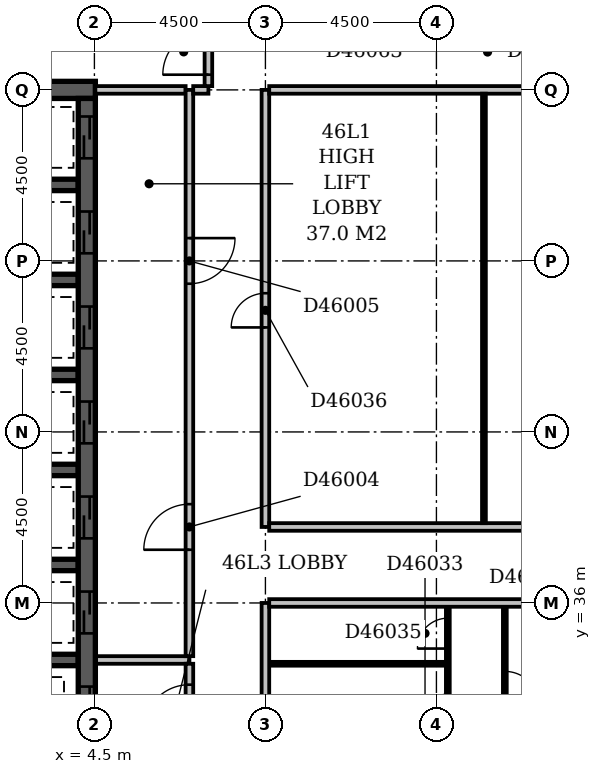
"""IFC4 building model, lengths in metres.
Left out: names, types, materials, properties, quantities, classifications, styles, units other than length and angle.
Written with IfcOpenShell. Run it as: python <this file> out.ifc"""

import sys

from ifc_helpers import new_model, si_unit, direction, frame, frame_2d, origin, place, context, subcontext, project, spatial, rectangle, extrude, element, fill, save


model = new_model("IFC4")
c1 = context("Model", 3, precision=1e-05, world=origin(), true_north=direction((0.0, 1.0)))
c2 = subcontext(c1, "Body", "Model", "MODEL_VIEW")
j1 = project(units=[si_unit("LENGTHUNIT", "METRE"), si_unit("PLANEANGLEUNIT", "RADIAN")], contexts=[c1])
p1 = place(None, origin())
s1 = spatial("IfcSite", under=j1, at=p1, CompositionType="ELEMENT")
p2 = place(p1, origin())
s2 = spatial("IfcBuilding", under=s1, at=p2, CompositionType="ELEMENT")
p3 = place(p2, frame((0.0, 0.0, 182.6)))
s3 = spatial("IfcBuildingStorey", under=s2, at=p3, CompositionType="ELEMENT", Elevation=182.6)
p4 = place(p3, frame((0.275, 49.5, -0.3), z_axis=(0.0, 0.0, 1.0), x_axis=(1.0, 0.0, 0.0)))
e1 = element("IfcWall", 1, at=p4, inside=s3, PredefinedType="SHEAR", context=c2, shape_type="SweptSolid", body=[
    extrude(rectangle(XDim=4.25, YDim=0.45, at=frame_2d((2.125, 0.0))), origin(), (0.0, 0.0, 1.0), 3.55),
])
for number, where, z_axis, x_axis in (
    (2, (0.725, 34.5, -0.3), (0.0, 0.0, 1.0), (1.0, 0.0, 0.0)),
    (3, (0.725, 37.0, -0.3), (0.0, 0.0, 1.0), (1.0, 0.0, 0.0)),
    (4, (0.725, 39.5, -0.3), (0.0, 0.0, 1.0), (1.0, 0.0, 0.0)),
    (5, (0.725, 42.0, -0.3), (0.0, 0.0, 1.0), (1.0, 0.0, 0.0)),
    (6, (0.725, 44.5, -0.3), (0.0, 0.0, 1.0), (1.0, 0.0, 0.0)),
    (7, (0.725, 47.0, -0.3), (0.0, 0.0, 1.0), (1.0, 0.0, 0.0)),
):
    element("IfcWall", number, at=place(p3, frame(where, z_axis=z_axis, x_axis=x_axis)), inside=s3, PredefinedType="SHEAR", context=c2, shape_type="SweptSolid", body=[
        extrude(rectangle(XDim=3.35, YDim=0.3, at=frame_2d((1.675, 0.0))), origin(), (0.0, 0.0, 1.0), 3.55),
    ])
p5 = place(p3, frame((4.3, 27.15, -0.3), z_axis=(0.0, 0.0, 1.0), x_axis=(0.0, 1.0, 0.0)))
e8 = element("IfcWall", 8, at=p5, inside=s3, PredefinedType="SHEAR", context=c2, shape_type="SweptSolid", body=[
    extrude(rectangle(XDim=22.125, YDim=0.45, at=frame_2d((11.062, 0.0))), origin(), (0.0, 0.0, 1.0), 3.55),
])
p6 = place(p5, frame((3.05, 0.0, 0.3)))
e9 = element("IfcOpeningElement", 9, at=p6, cuts=e8, PredefinedType="OPENING", context=c2, shape_type="SweptSolid", body=[
    extrude(rectangle(XDim=1.1, YDim=2.1, at=frame_2d((0.55, 1.05))), frame((0.0, 0.237, 0.0), z_axis=(0.0, -1.0, 0.0), x_axis=(1.0, 0.0, 0.0)), (0.0, 0.0, 1.0), 0.474),
])
p7 = place(p5, frame((0.55, 0.0, 0.3)))
e10 = element("IfcOpeningElement", 10, at=p7, cuts=e8, PredefinedType="OPENING", context=c2, shape_type="SweptSolid", body=[
    extrude(rectangle(XDim=1.1, YDim=2.1, at=frame_2d((0.55, 1.05))), frame((0.0, 0.237, 0.0), z_axis=(0.0, -1.0, 0.0), x_axis=(1.0, 0.0, 0.0)), (0.0, 0.0, 1.0), 0.474),
])
p8 = place(p5, frame((20.55, 0.0, 0.3)))
e11 = element("IfcOpeningElement", 11, at=p8, cuts=e8, PredefinedType="OPENING", context=c2, shape_type="SweptSolid", body=[
    extrude(rectangle(XDim=1.1, YDim=2.1, at=frame_2d((0.55, 1.05))), frame((0.0, 0.237, 0.0), z_axis=(0.0, -1.0, 0.0), x_axis=(1.0, 0.0, 0.0)), (0.0, 0.0, 1.0), 0.474),
])
p9 = place(p5, frame((18.05, 0.0, 0.3)))
e12 = element("IfcOpeningElement", 12, at=p9, cuts=e8, PredefinedType="OPENING", context=c2, shape_type="SweptSolid", body=[
    extrude(rectangle(XDim=1.1, YDim=2.1, at=frame_2d((0.55, 1.05))), frame((0.0, 0.237, 0.0), z_axis=(0.0, -1.0, 0.0), x_axis=(1.0, 0.0, 0.0)), (0.0, 0.0, 1.0), 0.474),
])
p10 = place(p5, frame((15.55, 0.0, 0.3)))
e13 = element("IfcOpeningElement", 13, at=p10, cuts=e8, PredefinedType="OPENING", context=c2, shape_type="SweptSolid", body=[
    extrude(rectangle(XDim=1.1, YDim=2.1, at=frame_2d((0.55, 1.05))), frame((0.0, 0.237, 0.0), z_axis=(0.0, -1.0, 0.0), x_axis=(1.0, 0.0, 0.0)), (0.0, 0.0, 1.0), 0.474),
])
p11 = place(p5, frame((13.05, 0.0, 0.3)))
e14 = element("IfcOpeningElement", 14, at=p11, cuts=e8, PredefinedType="OPENING", context=c2, shape_type="SweptSolid", body=[
    extrude(rectangle(XDim=1.1, YDim=2.1, at=frame_2d((0.55, 1.05))), frame((0.0, 0.237, 0.0), z_axis=(0.0, -1.0, 0.0), x_axis=(1.0, 0.0, 0.0)), (0.0, 0.0, 1.0), 0.474),
])
p12 = place(p5, frame((10.55, 0.0, 0.3)))
e15 = element("IfcOpeningElement", 15, at=p12, cuts=e8, PredefinedType="OPENING", context=c2, shape_type="SweptSolid", body=[
    extrude(rectangle(XDim=1.1, YDim=2.1, at=frame_2d((0.55, 1.05))), frame((0.0, 0.237, 0.0), z_axis=(0.0, -1.0, 0.0), x_axis=(1.0, 0.0, 0.0)), (0.0, 0.0, 1.0), 0.474),
])
p13 = place(p5, frame((8.05, 0.0, 0.3)))
e16 = element("IfcOpeningElement", 16, at=p13, cuts=e8, PredefinedType="OPENING", context=c2, shape_type="SweptSolid", body=[
    extrude(rectangle(XDim=1.1, YDim=2.1, at=frame_2d((0.55, 1.05))), frame((0.0, 0.237, 0.0), z_axis=(0.0, -1.0, 0.0), x_axis=(1.0, 0.0, 0.0)), (0.0, 0.0, 1.0), 0.474),
])
p14 = place(p5, frame((5.55, 0.0, 0.3)))
e17 = element("IfcOpeningElement", 17, at=p14, cuts=e8, PredefinedType="OPENING", context=c2, shape_type="SweptSolid", body=[
    extrude(rectangle(XDim=1.1, YDim=2.1, at=frame_2d((0.55, 1.05))), frame((0.0, 0.237, 0.0), z_axis=(0.0, -1.0, 0.0), x_axis=(1.0, 0.0, 0.0)), (0.0, 0.0, 1.0), 0.474),
])
p15 = place(p3, frame((4.545, 34.5, 0.0), z_axis=(0.0, 0.0, 1.0), x_axis=(1.0, 0.0, 0.0)))
e18 = element("IfcWall", 18, at=p15, inside=s3, PredefinedType="PARTITIONING", context=c2, shape_type="SweptSolid", body=[
    extrude(rectangle(XDim=2.455, YDim=0.2, at=frame_2d((1.228, 0.0))), origin(), (0.0, 0.0, 1.0), 3.25),
])
p16 = place(p3, frame((7.0, 34.6, 0.0), z_axis=(0.0, 0.0, 1.0), x_axis=(0.0, 1.0, 0.0)))
e19 = element("IfcWall", 19, at=p16, inside=s3, PredefinedType="PARTITIONING", context=c2, shape_type="SweptSolid", body=[
    extrude(rectangle(XDim=14.9, YDim=0.2, at=frame_2d((7.45, 0.0))), origin(), (0.0, 0.0, 1.0), 3.25),
])
p17 = place(p16, frame((2.8, 0.0, 0.0)))
e20 = element("IfcOpeningElement", 20, at=p17, cuts=e19, PredefinedType="OPENING", context=c2, shape_type="SweptSolid", body=[
    extrude(rectangle(XDim=1.2, YDim=2.1, at=frame_2d((0.6, 1.05))), frame((0.0, 0.112, 0.0), z_axis=(0.0, -1.0, 0.0), x_axis=(1.0, 0.0, 0.0)), (0.0, 0.0, 1.0), 0.224),
])
p18 = place(p16, frame((9.8, 0.0, 0.0)))
e21 = element("IfcOpeningElement", 21, at=p18, cuts=e19, PredefinedType="OPENING", context=c2, shape_type="SweptSolid", body=[
    extrude(rectangle(XDim=1.2, YDim=2.1, at=frame_2d((0.6, 1.05))), frame((0.0, 0.112, 0.0), z_axis=(0.0, -1.0, 0.0), x_axis=(1.0, 0.0, 0.0)), (0.0, 0.0, 1.0), 0.224),
])
p19 = place(p3, frame((4.525, 49.5, 0.0), z_axis=(0.0, 0.0, 1.0), x_axis=(1.0, 0.0, 0.0)))
e22 = element("IfcWall", 22, at=p19, inside=s3, PredefinedType="PARTITIONING", context=c2, shape_type="SweptSolid", body=[
    extrude(rectangle(XDim=2.375, YDim=0.2, at=frame_2d((1.188, 0.0))), origin(), (0.0, 0.0, 1.0), 3.25),
])
p20 = place(p3, frame((7.0, 32.1, 0.0), z_axis=(0.0, 0.0, 1.0), x_axis=(0.0, 1.0, 0.0)))
e23 = element("IfcWall", 23, at=p20, inside=s3, PredefinedType="PARTITIONING", context=c2, shape_type="SweptSolid", body=[
    extrude(rectangle(XDim=2.3, YDim=0.2, at=frame_2d((1.15, 0.0))), origin(), (0.0, 0.0, 1.0), 3.25),
])
p21 = place(p20, frame((0.55, 0.0, 0.0)))
e24 = element("IfcOpeningElement", 24, at=p21, cuts=e23, PredefinedType="OPENING", context=c2, shape_type="SweptSolid", body=[
    extrude(rectangle(XDim=1.2, YDim=2.1, at=frame_2d((0.6, 1.05))), frame((0.0, 0.112, 0.0), z_axis=(0.0, -1.0, 0.0), x_axis=(1.0, 0.0, 0.0)), (0.0, 0.0, 1.0), 0.224),
])
p22 = place(p3, frame((7.1, 49.5, 0.0), z_axis=(0.0, 0.0, 1.0), x_axis=(1.0, 0.0, 0.0)))
e25 = element("IfcWall", 25, at=p22, inside=s3, PredefinedType="PARTITIONING", context=c2, shape_type="SweptSolid", body=[
    extrude(rectangle(XDim=0.4, YDim=0.2, at=frame_2d((0.2, 0.0))), origin(), (0.0, 0.0, 1.0), 3.25),
])
p23 = place(p3, frame((7.5, 49.6, 0.0), z_axis=(0.0, 0.0, 1.0), x_axis=(0.0, 1.0, 0.0)))
e26 = element("IfcWall", 26, at=p23, inside=s3, PredefinedType="PARTITIONING", context=c2, shape_type="SweptSolid", body=[
    extrude(rectangle(XDim=3.9, YDim=0.2, at=frame_2d((1.95, 0.0))), origin(), (0.0, 0.0, 1.0), 3.25),
])
p24 = place(p23, frame((0.3, 0.0, 0.0)))
e27 = element("IfcOpeningElement", 27, at=p24, cuts=e26, PredefinedType="OPENING", context=c2, shape_type="SweptSolid", body=[
    extrude(rectangle(XDim=1.2, YDim=2.1, at=frame_2d((0.6, 1.05))), frame((0.0, 0.112, 0.0), z_axis=(0.0, -1.0, 0.0), x_axis=(1.0, 0.0, 0.0)), (0.0, 0.0, 1.0), 0.224),
])
p25 = place(p3, frame((9.0, 5.0, 0.0), z_axis=(0.0, 0.0, 1.0), x_axis=(0.0, 1.0, 0.0)))
e28 = element("IfcWall", 28, at=p25, inside=s3, PredefinedType="PARTITIONING", context=c2, shape_type="SweptSolid", body=[
    extrude(rectangle(XDim=31.0, YDim=0.2, at=frame_2d((15.5, 0.0))), origin(), (0.0, 0.0, 1.0), 3.25),
])
p26 = place(p25, frame((17.8, 0.0, 0.0)))
e29 = element("IfcOpeningElement", 29, at=p26, cuts=e28, PredefinedType="OPENING", context=c2, shape_type="SweptSolid", body=[
    extrude(rectangle(XDim=1.0, YDim=2.1, at=frame_2d((0.5, 1.05))), frame((0.0, 0.112, 0.0), z_axis=(0.0, -1.0, 0.0), x_axis=(1.0, 0.0, 0.0)), (0.0, 0.0, 1.0), 0.224),
])
p27 = place(p25, frame((14.95, 0.0, 0.0)))
e30 = element("IfcOpeningElement", 30, at=p27, cuts=e28, PredefinedType="OPENING", context=c2, shape_type="SweptSolid", body=[
    extrude(rectangle(XDim=1.0, YDim=2.1, at=frame_2d((0.5, 1.05))), frame((0.0, 0.112, 0.0), z_axis=(0.0, -1.0, 0.0), x_axis=(1.0, 0.0, 0.0)), (0.0, 0.0, 1.0), 0.224),
])
p28 = place(p25, frame((9.3, 0.0, 0.0)))
e31 = element("IfcOpeningElement", 31, at=p28, cuts=e28, PredefinedType="OPENING", context=c2, shape_type="SweptSolid", body=[
    extrude(rectangle(XDim=1.0, YDim=2.1, at=frame_2d((0.5, 1.05))), frame((0.0, 0.112, 0.0), z_axis=(0.0, -1.0, 0.0), x_axis=(1.0, 0.0, 0.0)), (0.0, 0.0, 1.0), 0.224),
])
p29 = place(p25, frame((1.5, 0.0, 0.0)))
e32 = element("IfcOpeningElement", 32, at=p29, cuts=e28, PredefinedType="OPENING", context=c2, shape_type="SweptSolid", body=[
    extrude(rectangle(XDim=0.9, YDim=2.1, at=frame_2d((0.45, 1.05))), frame((0.0, 0.112, 0.0), z_axis=(0.0, -1.0, 0.0), x_axis=(1.0, 0.0, 0.0)), (0.0, 0.0, 1.0), 0.224),
])
p30 = place(p3, frame((15.3, 22.6, 0.0), z_axis=(0.0, 0.0, 1.0), x_axis=(0.0, 1.0, 0.0)))
e33 = element("IfcWall", 33, at=p30, inside=s3, PredefinedType="PARTITIONING", context=c2, shape_type="SweptSolid", body=[
    extrude(rectangle(XDim=13.3, YDim=0.1, at=frame_2d((6.65, 0.0))), origin(), (0.0, 0.0, 1.0), 3.25),
])
p31 = place(p30, frame((1.7, 0.0, 0.0)))
e34 = element("IfcOpeningElement", 34, at=p31, cuts=e33, PredefinedType="OPENING", context=c2, shape_type="SweptSolid", body=[
    extrude(rectangle(XDim=0.9, YDim=2.1, at=frame_2d((0.45, 1.05))), frame((0.0, 0.062, 0.0), z_axis=(0.0, -1.0, 0.0), x_axis=(1.0, 0.0, 0.0)), (0.0, 0.0, 1.0), 0.124),
])
p32 = place(p30, frame((6.2, 0.0, 0.0)))
e35 = element("IfcOpeningElement", 35, at=p32, cuts=e33, PredefinedType="OPENING", context=c2, shape_type="SweptSolid", body=[
    extrude(rectangle(XDim=0.9, YDim=2.1, at=frame_2d((0.45, 1.05))), frame((0.0, 0.062, 0.0), z_axis=(0.0, -1.0, 0.0), x_axis=(1.0, 0.0, 0.0)), (0.0, 0.0, 1.0), 0.124),
])
p33 = place(p30, frame((10.7, 0.0, 0.0)))
e36 = element("IfcOpeningElement", 36, at=p33, cuts=e33, PredefinedType="OPENING", context=c2, shape_type="SweptSolid", body=[
    extrude(rectangle(XDim=0.9, YDim=2.1, at=frame_2d((0.45, 1.05))), frame((0.0, 0.062, 0.0), z_axis=(0.0, -1.0, 0.0), x_axis=(1.0, 0.0, 0.0)), (0.0, 0.0, 1.0), 0.124),
])
p34 = place(p3, frame((13.8, 24.1, 0.0), z_axis=(0.0, 0.0, 1.0), x_axis=(0.0, 1.0, 0.0)))
e37 = element("IfcWall", 37, at=p34, inside=s3, PredefinedType="PARTITIONING", context=c2, shape_type="SweptSolid", body=[
    extrude(rectangle(XDim=11.8, YDim=0.1, at=frame_2d((5.9, 0.0))), origin(), (0.0, 0.0, 1.0), 3.25),
])
p35 = place(p34, frame((8.7, 0.0, 0.0)))
e38 = element("IfcOpeningElement", 38, at=p35, cuts=e37, PredefinedType="OPENING", context=c2, shape_type="SweptSolid", body=[
    extrude(rectangle(XDim=0.8, YDim=2.1, at=frame_2d((0.4, 1.05))), frame((0.0, 0.062, 0.0), z_axis=(0.0, -1.0, 0.0), x_axis=(1.0, 0.0, 0.0)), (0.0, 0.0, 1.0), 0.124),
])
p36 = place(p34, frame((3.5, 0.0, 0.0)))
e39 = element("IfcOpeningElement", 39, at=p36, cuts=e37, PredefinedType="OPENING", context=c2, shape_type="SweptSolid", body=[
    extrude(rectangle(XDim=0.9, YDim=2.1, at=frame_2d((0.45, 1.05))), frame((0.0, 0.062, 0.0), z_axis=(0.0, -1.0, 0.0), x_axis=(1.0, 0.0, 0.0)), (0.0, 0.0, 1.0), 0.124),
])
p37 = place(p34, frame((10.7, 0.0, 0.0)))
e40 = element("IfcOpeningElement", 40, at=p37, cuts=e37, PredefinedType="OPENING", context=c2, shape_type="SweptSolid", body=[
    extrude(rectangle(XDim=0.8, YDim=2.1, at=frame_2d((0.4, 1.05))), frame((0.0, 0.062, 0.0), z_axis=(0.0, -1.0, 0.0), x_axis=(1.0, 0.0, 0.0)), (0.0, 0.0, 1.0), 0.124),
])
p38 = place(p3, frame((9.1, 34.4, 0.0), z_axis=(0.0, 0.0, 1.0), x_axis=(1.0, 0.0, 0.0)))
e41 = element("IfcWall", 41, at=p38, inside=s3, PredefinedType="PLUMBINGWALL", context=c2, shape_type="SweptSolid", body=[
    extrude(rectangle(XDim=4.65, YDim=0.1, at=frame_2d((2.325, 0.0))), origin(), (0.0, 0.0, 1.0), 3.25),
])
p39 = place(p3, frame((9.1, 36.0, 0.0), z_axis=(0.0, 0.0, 1.0), x_axis=(1.0, 0.0, 0.0)))
e42 = element("IfcWall", 42, at=p39, inside=s3, PredefinedType="PARTITIONING", context=c2, shape_type="SweptSolid", body=[
    extrude(rectangle(XDim=12.95, YDim=0.2, at=frame_2d((6.475, 0.0))), origin(), (0.0, 0.0, 1.0), 3.25),
])
p40 = place(p3, frame((9.0, 38.0, 0.0), z_axis=(0.0, 0.0, 1.0), x_axis=(0.0, 1.0, 0.0)))
e43 = element("IfcWall", 43, at=p40, inside=s3, PredefinedType="PARTITIONING", context=c2, shape_type="SweptSolid", body=[
    extrude(rectangle(XDim=11.5, YDim=0.2, at=frame_2d((5.75, 0.0))), origin(), (0.0, 0.0, 1.0), 3.25),
])
p41 = place(p40, frame((5.25, 0.0, 0.0)))
e44 = element("IfcOpeningElement", 44, at=p41, cuts=e43, PredefinedType="OPENING", context=c2, shape_type="SweptSolid", body=[
    extrude(rectangle(XDim=0.9, YDim=2.1, at=frame_2d((0.45, 1.05))), frame((0.0, 0.112, 0.0), z_axis=(0.0, -1.0, 0.0), x_axis=(1.0, 0.0, 0.0)), (0.0, 0.0, 1.0), 0.224),
])
p42 = place(p3, frame((9.1, 38.0, 0.0), z_axis=(0.0, 0.0, 1.0), x_axis=(1.0, 0.0, 0.0)))
e45 = element("IfcWall", 45, at=p42, inside=s3, PredefinedType="PARTITIONING", context=c2, shape_type="SweptSolid", body=[
    extrude(rectangle(XDim=11.3, YDim=0.2, at=frame_2d((5.65, 0.0))), origin(), (0.0, 0.0, 1.0), 3.25),
])
p43 = place(p3, frame((14.75, 38.1, 0.0), z_axis=(0.0, 0.0, 1.0), x_axis=(0.0, 1.0, 0.0)))
e46 = element("IfcWall", 46, at=p43, inside=s3, PredefinedType="PARTITIONING", context=c2, shape_type="SweptSolid", body=[
    extrude(rectangle(XDim=11.3, YDim=0.1, at=frame_2d((5.65, 0.0))), origin(), (0.0, 0.0, 1.0), 3.25),
])
p44 = place(p3, frame((9.1, 49.5, 0.0), z_axis=(0.0, 0.0, 1.0), x_axis=(1.0, 0.0, 0.0)))
e47 = element("IfcWall", 47, at=p44, inside=s3, PredefinedType="PARTITIONING", context=c2, shape_type="SweptSolid", body=[
    extrude(rectangle(XDim=11.3, YDim=0.2, at=frame_2d((5.65, 0.0))), origin(), (0.0, 0.0, 1.0), 3.25),
])
p45 = place(p44, frame((8.025, 0.0, 0.0)))
e48 = element("IfcOpeningElement", 48, at=p45, cuts=e47, PredefinedType="OPENING", context=c2, shape_type="SweptSolid", body=[
    extrude(rectangle(XDim=0.9, YDim=2.1, at=frame_2d((0.45, 1.05))), frame((0.0, 0.112, 0.0), z_axis=(0.0, -1.0, 0.0), x_axis=(1.0, 0.0, 0.0)), (0.0, 0.0, 1.0), 0.224),
])
p46 = place(p24, origin())
e49 = element("IfcDoor", 49, at=p46, inside=s3, OperationType="SINGLE_SWING_LEFT", PredefinedType="DOOR", context=c2, shape_type="SweptSolid", body=[
    extrude(rectangle(XDim=1.2, YDim=2.1, at=frame_2d((0.6, 1.05))), frame((0.0, 0.025, 0.0), z_axis=(0.0, -1.0, 0.0), x_axis=(1.0, 0.0, 0.0)), (0.0, 0.0, 1.0), 0.05),
])
fill(e27, e49)
p47 = place(p8, origin())
e50 = element("IfcDoor", 50, at=p47, inside=s3, OperationType="SLIDING_TO_LEFT", PredefinedType="DOOR", context=c2, shape_type="SweptSolid", body=[
    extrude(rectangle(XDim=1.1, YDim=2.1, at=frame_2d((0.55, 1.05))), frame((0.0, 0.025, 0.0), z_axis=(0.0, -1.0, 0.0), x_axis=(1.0, 0.0, 0.0)), (0.0, 0.0, 1.0), 0.05),
])
fill(e11, e50)
p48 = place(p9, origin())
e51 = element("IfcDoor", 51, at=p48, inside=s3, OperationType="SLIDING_TO_LEFT", PredefinedType="DOOR", context=c2, shape_type="SweptSolid", body=[
    extrude(rectangle(XDim=1.1, YDim=2.1, at=frame_2d((0.55, 1.05))), frame((0.0, 0.025, 0.0), z_axis=(0.0, -1.0, 0.0), x_axis=(1.0, 0.0, 0.0)), (0.0, 0.0, 1.0), 0.05),
])
fill(e12, e51)
p49 = place(p10, origin())
e52 = element("IfcDoor", 52, at=p49, inside=s3, OperationType="SLIDING_TO_LEFT", PredefinedType="DOOR", context=c2, shape_type="SweptSolid", body=[
    extrude(rectangle(XDim=1.1, YDim=2.1, at=frame_2d((0.55, 1.05))), frame((0.0, 0.025, 0.0), z_axis=(0.0, -1.0, 0.0), x_axis=(1.0, 0.0, 0.0)), (0.0, 0.0, 1.0), 0.05),
])
fill(e13, e52)
p50 = place(p11, origin())
e53 = element("IfcDoor", 53, at=p50, inside=s3, OperationType="SLIDING_TO_LEFT", PredefinedType="DOOR", context=c2, shape_type="SweptSolid", body=[
    extrude(rectangle(XDim=1.1, YDim=2.1, at=frame_2d((0.55, 1.05))), frame((0.0, 0.025, 0.0), z_axis=(0.0, -1.0, 0.0), x_axis=(1.0, 0.0, 0.0)), (0.0, 0.0, 1.0), 0.05),
])
fill(e14, e53)
p51 = place(p12, origin())
e54 = element("IfcDoor", 54, at=p51, inside=s3, OperationType="SLIDING_TO_LEFT", PredefinedType="DOOR", context=c2, shape_type="SweptSolid", body=[
    extrude(rectangle(XDim=1.1, YDim=2.1, at=frame_2d((0.55, 1.05))), frame((0.0, 0.025, 0.0), z_axis=(0.0, -1.0, 0.0), x_axis=(1.0, 0.0, 0.0)), (0.0, 0.0, 1.0), 0.05),
])
fill(e15, e54)
p52 = place(p13, origin())
e55 = element("IfcDoor", 55, at=p52, inside=s3, OperationType="SLIDING_TO_LEFT", PredefinedType="DOOR", context=c2, shape_type="SweptSolid", body=[
    extrude(rectangle(XDim=1.1, YDim=2.1, at=frame_2d((0.55, 1.05))), frame((0.0, 0.025, 0.0), z_axis=(0.0, -1.0, 0.0), x_axis=(1.0, 0.0, 0.0)), (0.0, 0.0, 1.0), 0.05),
])
fill(e16, e55)
p53 = place(p17, origin())
e56 = element("IfcDoor", 56, at=p53, inside=s3, OperationType="SINGLE_SWING_LEFT", PredefinedType="DOOR", context=c2, shape_type="SweptSolid", body=[
    extrude(rectangle(XDim=1.2, YDim=2.1, at=frame_2d((0.6, 1.05))), frame((0.0, 0.025, 0.0), z_axis=(0.0, -1.0, 0.0), x_axis=(1.0, 0.0, 0.0)), (0.0, 0.0, 1.0), 0.05),
])
fill(e20, e56)
p54 = place(p18, origin())
e57 = element("IfcDoor", 57, at=p54, inside=s3, OperationType="SINGLE_SWING_RIGHT", PredefinedType="DOOR", context=c2, shape_type="SweptSolid", body=[
    extrude(rectangle(XDim=1.2, YDim=2.1, at=frame_2d((0.6, 1.05))), frame((0.0, 0.025, 0.0), z_axis=(0.0, -1.0, 0.0), x_axis=(1.0, 0.0, 0.0)), (0.0, 0.0, 1.0), 0.05),
])
fill(e21, e57)
p55 = place(p21, origin())
e58 = element("IfcDoor", 58, at=p55, inside=s3, OperationType="SINGLE_SWING_LEFT", PredefinedType="DOOR", context=c2, shape_type="SweptSolid", body=[
    extrude(rectangle(XDim=1.2, YDim=2.1, at=frame_2d((0.6, 1.05))), frame((0.0, 0.025, 0.0), z_axis=(0.0, -1.0, 0.0), x_axis=(1.0, 0.0, 0.0)), (0.0, 0.0, 1.0), 0.05),
])
fill(e24, e58)
p56 = place(p14, origin())
e59 = element("IfcDoor", 59, at=p56, inside=s3, OperationType="SLIDING_TO_LEFT", PredefinedType="DOOR", context=c2, shape_type="SweptSolid", body=[
    extrude(rectangle(XDim=1.1, YDim=2.1, at=frame_2d((0.55, 1.05))), frame((0.0, 0.025, 0.0), z_axis=(0.0, -1.0, 0.0), x_axis=(1.0, 0.0, 0.0)), (0.0, 0.0, 1.0), 0.05),
])
fill(e17, e59)
p57 = place(p33, frame((0.9, 0.0, 0.0), z_axis=(0.0, 0.0, 1.0), x_axis=(-1.0, 0.0, 0.0)))
e60 = element("IfcDoor", 60, at=p57, inside=s3, OperationType="SINGLE_SWING_RIGHT", PredefinedType="DOOR", context=c2, shape_type="SweptSolid", body=[
    extrude(rectangle(XDim=0.9, YDim=2.1, at=frame_2d((0.45, 1.05))), frame((0.0, 0.025, 0.0), z_axis=(0.0, -1.0, 0.0), x_axis=(1.0, 0.0, 0.0)), (0.0, 0.0, 1.0), 0.05),
])
fill(e36, e60)
p58 = place(p37, origin())
e61 = element("IfcDoor", 61, at=p58, inside=s3, OperationType="SINGLE_SWING_LEFT", PredefinedType="DOOR", context=c2, shape_type="SweptSolid", body=[
    extrude(rectangle(XDim=0.8, YDim=2.1, at=frame_2d((0.4, 1.05))), frame((0.0, 0.025, 0.0), z_axis=(0.0, -1.0, 0.0), x_axis=(1.0, 0.0, 0.0)), (0.0, 0.0, 1.0), 0.05),
])
fill(e40, e61)
p59 = place(p41, origin())
e62 = element("IfcDoor", 62, at=p59, inside=s3, OperationType="SINGLE_SWING_LEFT", PredefinedType="DOOR", context=c2, shape_type="SweptSolid", body=[
    extrude(rectangle(XDim=0.9, YDim=2.1, at=frame_2d((0.45, 1.05))), frame((0.0, 0.025, 0.0), z_axis=(0.0, -1.0, 0.0), x_axis=(1.0, 0.0, 0.0)), (0.0, 0.0, 1.0), 0.05),
])
fill(e44, e62)
save(model, sys.argv[1])
